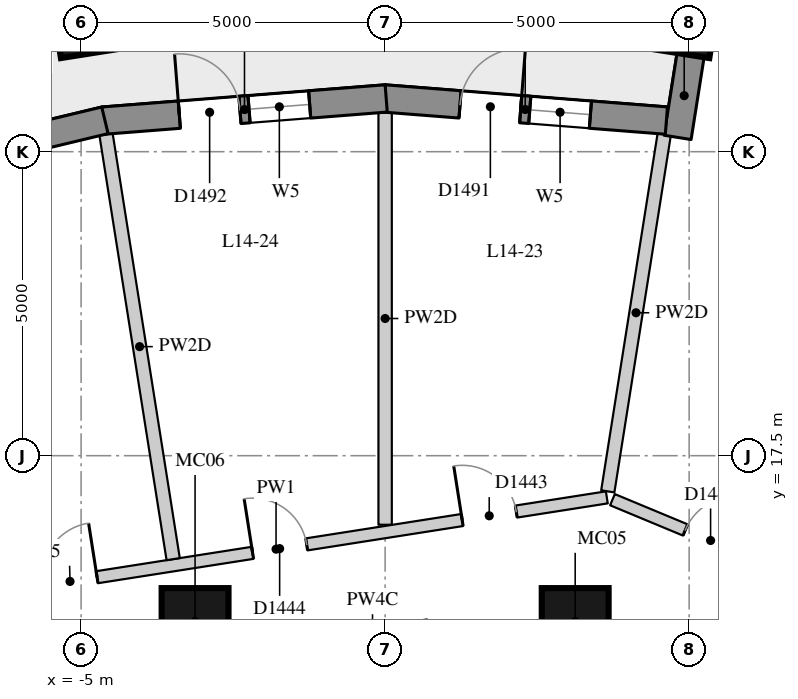
"""IFC4 building model, lengths in metres.
Left out: names, types, materials, properties, quantities, classifications, styles, units other than length and angle.
Written with IfcOpenShell. Run it as: python <this file> out.ifc"""

import sys

from ifc_helpers import new_model, si_unit, direction, frame, frame_2d, origin, origin_2d, place, context, subcontext, project, spatial, rectangle, extrude, element, fill, save


model = new_model("IFC4")
c1 = context("Model", 3, precision=1e-05, world=origin(), true_north=direction((0.0, 1.0)))
c2 = subcontext(c1, "Body", "Model", "MODEL_VIEW")
j1 = project(units=[si_unit("LENGTHUNIT", "METRE"), si_unit("PLANEANGLEUNIT", "RADIAN")], contexts=[c1])
p1 = place(None, origin())
s1 = spatial("IfcSite", under=j1, at=p1, CompositionType="ELEMENT")
p2 = place(p1, origin())
s2 = spatial("IfcBuilding", under=s1, at=p2, CompositionType="ELEMENT")
p3 = place(p2, frame((0.0, 0.0, 54.7)))
s3 = spatial("IfcBuildingStorey", under=s2, at=p3, CompositionType="ELEMENT", Elevation=54.7)
for number, where, z_axis, x_axis in (
    (1, (4.906, 24.866, 0.0), (0.0, 0.0, 1.0), (0.156, 0.988, 0.0)),
    (2, (-4.906, 24.866, 0.0), (0.0, 0.0, 1.0), (-0.156, 0.988, 0.0)),
):
    element("IfcColumn", number, at=place(p3, frame(where, z_axis=z_axis, x_axis=x_axis)), inside=s3, PredefinedType="COLUMN", context=c2, shape_type="SweptSolid", body=[
        extrude(rectangle(XDim=1.5, YDim=1.1, at=origin_2d()), origin(), (0.0, 0.0, 1.0), 3.3),
    ])
for number, where, z_axis, x_axis in (
    (3, (3.126, 14.772, 0.0), (0.0, 0.0, 1.0), (1.0, 0.0, 0.0)),
    (4, (-3.126, 14.772, 0.0), (0.0, 0.0, 1.0), (1.0, 0.0, 0.0)),
):
    element("IfcColumn", number, at=place(p3, frame(where, z_axis=z_axis, x_axis=x_axis)), inside=s3, PredefinedType="COLUMN", context=c2, shape_type="SweptSolid", body=[
        extrude(rectangle(XDim=1.1, YDim=1.1, at=origin_2d()), origin(), (0.0, 0.0, 1.0), 3.3),
    ])
p4 = place(p3, frame((9.308, 24.35, 0.0), z_axis=(0.0, 0.0, 1.0), x_axis=(-0.972496561493, 0.232917233979, 0.0)))
e5 = element("IfcWall", 5, at=p4, inside=s3, PredefinedType="SOLIDWALL", context=c2, shape_type="SweptSolid", body=[
    extrude(rectangle(XDim=3.911, YDim=0.45, at=frame_2d((1.956, 0.0))), origin(), (0.0, 0.0, 1.0), 3.02),
])
p5 = place(p4, frame((0.855, 0.0, 0.4)))
e6 = element("IfcOpeningElement", 6, at=p5, cuts=e5, PredefinedType="OPENING", context=c2, shape_type="SweptSolid", body=[
    extrude(rectangle(XDim=2.2, YDim=1.75, at=frame_2d((1.1, 0.875))), frame((0.0, 0.235, 0.0), z_axis=(0.0, -1.0, 0.0), x_axis=(1.0, 0.0, 0.0)), (0.0, 0.0, 1.0), 0.47),
])
p6 = place(p3, frame((5.027, 24.108, 0.0), z_axis=(0.0, 0.0, 1.0), x_axis=(-0.156133927791, -0.98773589415, 0.0)))
e7 = element("IfcWall", 7, at=p6, inside=s3, PredefinedType="SOLIDWALL", context=c2, shape_type="SweptSolid", body=[
    extrude(rectangle(XDim=1.39, YDim=0.45, at=frame_2d((0.695, 0.0))), origin(), (0.0, 0.0, 1.0), 2.47),
])
p7 = place(p3, frame((4.626, 23.011, 0.0), z_axis=(0.0, 0.0, 1.0), x_axis=(-0.996937095772, 0.078207589615, 0.0)))
e8 = element("IfcWall", 8, at=p7, inside=s3, PredefinedType="SOLIDWALL", context=c2, shape_type="SweptSolid", body=[
    extrude(rectangle(XDim=4.657, YDim=0.45, at=frame_2d((2.329, 0.0))), origin(), (0.0, 0.0, 1.0), 3.02),
])
p8 = place(p7, frame((1.254, 0.0, 0.4)))
e9 = element("IfcOpeningElement", 9, at=p8, cuts=e8, PredefinedType="OPENING", context=c2, shape_type="SweptSolid", body=[
    extrude(rectangle(XDim=1.0, YDim=1.75, at=frame_2d((0.5, 0.875))), frame((0.0, 0.235, 0.0), z_axis=(0.0, -1.0, 0.0), x_axis=(1.0, 0.0, 0.0)), (0.0, 0.0, 1.0), 0.47),
])
p9 = place(p7, frame((2.404, 0.0, 0.0)))
e10 = element("IfcOpeningElement", 10, at=p9, cuts=e8, PredefinedType="OPENING", context=c2, shape_type="SweptSolid", body=[
    extrude(rectangle(XDim=1.0, YDim=2.15, at=frame_2d((0.5, 1.075))), frame((0.0, 0.235, 0.0), z_axis=(0.0, -1.0, 0.0), x_axis=(1.0, 0.0, 0.0)), (0.0, 0.0, 1.0), 0.47),
])
p10 = place(p3, frame((0.018, 23.376, 0.0), z_axis=(0.0, 0.0, 1.0), x_axis=(-0.996935982964, -0.078221773648, 0.0)))
e11 = element("IfcWall", 11, at=p10, inside=s3, PredefinedType="SOLIDWALL", context=c2, shape_type="SweptSolid", body=[
    extrude(rectangle(XDim=4.676, YDim=0.45, at=frame_2d((2.338, 0.0))), origin(), (0.0, 0.0, 1.0), 3.02),
])
p11 = place(p10, frame((1.263, 0.0, 0.4)))
e12 = element("IfcOpeningElement", 12, at=p11, cuts=e11, PredefinedType="OPENING", context=c2, shape_type="SweptSolid", body=[
    extrude(rectangle(XDim=1.0, YDim=1.75, at=frame_2d((0.5, 0.875))), frame((0.0, 0.235, 0.0), z_axis=(0.0, -1.0, 0.0), x_axis=(1.0, 0.0, 0.0)), (0.0, 0.0, 1.0), 0.47),
])
p12 = place(p10, frame((2.413, 0.0, 0.0)))
e13 = element("IfcOpeningElement", 13, at=p12, cuts=e11, PredefinedType="OPENING", context=c2, shape_type="SweptSolid", body=[
    extrude(rectangle(XDim=1.0, YDim=2.15, at=frame_2d((0.5, 1.075))), frame((0.0, 0.235, 0.0), z_axis=(0.0, -1.0, 0.0), x_axis=(1.0, 0.0, 0.0)), (0.0, 0.0, 1.0), 0.47),
])
p13 = place(p3, frame((-4.608, 23.016, 0.0), z_axis=(0.0, 0.0, 1.0), x_axis=(-0.972343667289, -0.233554688847, 0.0)))
e14 = element("IfcWall", 14, at=p13, inside=s3, PredefinedType="SOLIDWALL", context=c2, shape_type="SweptSolid", body=[
    extrude(rectangle(XDim=4.624, YDim=0.45, at=frame_2d((2.312, 0.0))), origin(), (0.0, 0.0, 1.0), 3.02),
])
p14 = place(p13, frame((1.237, 0.0, 0.4)))
e15 = element("IfcOpeningElement", 15, at=p14, cuts=e14, PredefinedType="OPENING", context=c2, shape_type="SweptSolid", body=[
    extrude(rectangle(XDim=1.0, YDim=1.75, at=frame_2d((0.5, 0.875))), frame((0.0, 0.235, 0.0), z_axis=(0.0, -1.0, 0.0), x_axis=(1.0, 0.0, 0.0)), (0.0, 0.0, 1.0), 0.47),
])
p15 = place(p13, frame((2.387, 0.0, 0.0)))
e16 = element("IfcOpeningElement", 16, at=p15, cuts=e14, PredefinedType="OPENING", context=c2, shape_type="SweptSolid", body=[
    extrude(rectangle(XDim=1.0, YDim=2.15, at=frame_2d((0.5, 1.075))), frame((0.0, 0.235, 0.0), z_axis=(0.0, -1.0, 0.0), x_axis=(1.0, 0.0, 0.0)), (0.0, 0.0, 1.0), 0.47),
])
p16 = place(p3, frame((-7.234, 15.11, 0.0), z_axis=(0.0, 0.0, 1.0), x_axis=(0.987957763282, 0.154723811906, 0.0)))
e17 = element("IfcWall", 17, at=p16, inside=s3, PredefinedType="PARTITIONING", context=c2, shape_type="SweptSolid", body=[
    extrude(rectangle(XDim=11.012, YDim=0.2, at=frame_2d((5.506, 0.0))), origin(), (0.0, 0.0, 1.0), 3.02),
])
p17 = place(p16, frame((8.605, 0.0, 0.0)))
e18 = element("IfcOpeningElement", 18, at=p17, cuts=e17, PredefinedType="OPENING", context=c2, shape_type="SweptSolid", body=[
    extrude(rectangle(XDim=0.9, YDim=2.1, at=frame_2d((0.45, 1.05))), frame((0.0, 0.11, 0.0), z_axis=(0.0, -1.0, 0.0), x_axis=(1.0, 0.0, 0.0)), (0.0, 0.0, 1.0), 0.22),
])
p18 = place(p16, frame((5.116, 0.0, 0.0)))
e19 = element("IfcOpeningElement", 19, at=p18, cuts=e17, PredefinedType="OPENING", context=c2, shape_type="SweptSolid", body=[
    extrude(rectangle(XDim=0.9, YDim=2.1, at=frame_2d((0.45, 1.05))), frame((0.0, 0.11, 0.0), z_axis=(0.0, -1.0, 0.0), x_axis=(1.0, 0.0, 0.0)), (0.0, 0.0, 1.0), 0.22),
])
p19 = place(p16, frame((1.626, 0.0, 0.0)))
e20 = element("IfcOpeningElement", 20, at=p19, cuts=e17, PredefinedType="OPENING", context=c2, shape_type="SweptSolid", body=[
    extrude(rectangle(XDim=0.9, YDim=2.1, at=frame_2d((0.45, 1.05))), frame((0.0, 0.11, 0.0), z_axis=(0.0, -1.0, 0.0), x_axis=(1.0, 0.0, 0.0)), (0.0, 0.0, 1.0), 0.22),
])
p20 = place(p3, frame((3.739, 16.776, 0.0), z_axis=(0.0, 0.0, 1.0), x_axis=(0.923364778497, -0.383923802117, 0.0)))
e21 = element("IfcWall", 21, at=p20, inside=s3, PredefinedType="PARTITIONING", context=c2, shape_type="SweptSolid", body=[
    extrude(rectangle(XDim=8.273, YDim=0.2, at=frame_2d((4.137, 0.0))), origin(), (0.0, 0.0, 1.0), 3.02),
])
p21 = place(p20, frame((6.153, 0.0, 0.0)))
e22 = element("IfcOpeningElement", 22, at=p21, cuts=e21, PredefinedType="OPENING", context=c2, shape_type="SweptSolid", body=[
    extrude(rectangle(XDim=1.1, YDim=2.1, at=frame_2d((0.55, 1.05))), frame((0.0, 0.11, 0.0), z_axis=(0.0, -1.0, 0.0), x_axis=(1.0, 0.0, 0.0)), (0.0, 0.0, 1.0), 0.22),
])
p22 = place(p20, frame((1.298, 0.0, 0.0)))
e23 = element("IfcOpeningElement", 23, at=p22, cuts=e21, PredefinedType="OPENING", context=c2, shape_type="SweptSolid", body=[
    extrude(rectangle(XDim=0.9, YDim=2.1, at=frame_2d((0.45, 1.05))), frame((0.0, 0.11, 0.0), z_axis=(0.0, -1.0, 0.0), x_axis=(1.0, 0.0, 0.0)), (0.0, 0.0, 1.0), 0.22),
])
p23 = place(p3, frame((4.591, 22.789, 0.0), z_axis=(0.0, 0.0, 1.0), x_axis=(-0.156126964527, -0.987736994826, 0.0)))
e24 = element("IfcWall", 24, at=p23, inside=s3, PredefinedType="PARTITIONING", context=c2, shape_type="SweptSolid", body=[
    extrude(rectangle(XDim=5.948, YDim=0.22, at=frame_2d((2.974, 0.0))), origin(), (0.0, 0.0, 1.0), 2.47),
])
p24 = place(p3, frame((0.0, 23.149, 0.0), z_axis=(0.0, 0.0, 1.0), x_axis=(0.0, -1.0, 0.0)))
e25 = element("IfcWall", 25, at=p24, inside=s3, PredefinedType="PARTITIONING", context=c2, shape_type="SweptSolid", body=[
    extrude(rectangle(XDim=6.784, YDim=0.22, at=frame_2d((3.392, 0.0))), origin(), (0.0, 0.0, 1.0), 2.47),
])
p25 = place(p3, frame((-4.591, 22.789, 0.0), z_axis=(0.0, 0.0, 1.0), x_axis=(0.15613617795, -0.987735538459, 0.0)))
e26 = element("IfcWall", 26, at=p25, inside=s3, PredefinedType="PARTITIONING", context=c2, shape_type="SweptSolid", body=[
    extrude(rectangle(XDim=7.077, YDim=0.22, at=frame_2d((3.539, 0.0))), origin(), (0.0, 0.0, 1.0), 2.47),
])
p26 = place(p8, origin())
e27 = element("IfcWindow", 27, at=p26, inside=s3, PartitioningType="SINGLE_PANEL", PredefinedType="WINDOW", context=c2, shape_type="SweptSolid", body=[
    extrude(rectangle(XDim=1.0, YDim=1.75, at=frame_2d((0.5, 0.875))), frame((0.0, 0.035, 0.0), z_axis=(0.0, -1.0, 0.0), x_axis=(1.0, 0.0, 0.0)), (0.0, 0.0, 1.0), 0.06),
])
fill(e9, e27)
p27 = place(p9, frame((1.0, 0.0, 0.0), z_axis=(0.0, 0.0, 1.0), x_axis=(-1.0, 0.0, 0.0)))
e28 = element("IfcDoor", 28, at=p27, inside=s3, OperationType="SINGLE_SWING_RIGHT", PredefinedType="DOOR", context=c2, shape_type="SweptSolid", body=[
    extrude(rectangle(XDim=1.0, YDim=2.15, at=frame_2d((0.5, 1.075))), frame((0.0, 0.075, 0.0), z_axis=(0.0, -1.0, 0.0), x_axis=(1.0, 0.0, 0.0)), (0.0, 0.0, 1.0), 0.05),
])
fill(e10, e28)
p28 = place(p11, origin())
e29 = element("IfcWindow", 29, at=p28, inside=s3, PartitioningType="SINGLE_PANEL", PredefinedType="WINDOW", context=c2, shape_type="SweptSolid", body=[
    extrude(rectangle(XDim=1.0, YDim=1.75, at=frame_2d((0.5, 0.875))), frame((0.0, 0.035, 0.0), z_axis=(0.0, -1.0, 0.0), x_axis=(1.0, 0.0, 0.0)), (0.0, 0.0, 1.0), 0.06),
])
fill(e12, e29)
p29 = place(p12, frame((1.0, 0.0, 0.0), z_axis=(0.0, 0.0, 1.0), x_axis=(-1.0, 0.0, 0.0)))
e30 = element("IfcDoor", 30, at=p29, inside=s3, OperationType="SINGLE_SWING_LEFT", PredefinedType="DOOR", context=c2, shape_type="SweptSolid", body=[
    extrude(rectangle(XDim=1.0, YDim=2.15, at=frame_2d((0.5, 1.075))), frame((0.0, 0.075, 0.0), z_axis=(0.0, -1.0, 0.0), x_axis=(1.0, 0.0, 0.0)), (0.0, 0.0, 1.0), 0.05),
])
fill(e13, e30)
p30 = place(p22, origin())
e31 = element("IfcDoor", 31, at=p30, inside=s3, OperationType="SINGLE_SWING_RIGHT", PredefinedType="DOOR", context=c2, shape_type="SweptSolid", body=[
    extrude(rectangle(XDim=0.9, YDim=2.1, at=frame_2d((0.45, 1.05))), frame((0.0, 0.025, 0.0), z_axis=(0.0, -1.0, 0.0), x_axis=(1.0, 0.0, 0.0)), (0.0, 0.0, 1.0), 0.05),
])
fill(e23, e31)
p31 = place(p17, origin())
e32 = element("IfcDoor", 32, at=p31, inside=s3, OperationType="SINGLE_SWING_LEFT", PredefinedType="DOOR", context=c2, shape_type="SweptSolid", body=[
    extrude(rectangle(XDim=0.9, YDim=2.1, at=frame_2d((0.45, 1.05))), frame((0.0, 0.025, 0.0), z_axis=(0.0, -1.0, 0.0), x_axis=(1.0, 0.0, 0.0)), (0.0, 0.0, 1.0), 0.05),
])
fill(e18, e32)
p32 = place(p18, origin())
e33 = element("IfcDoor", 33, at=p32, inside=s3, OperationType="SINGLE_SWING_LEFT", PredefinedType="DOOR", context=c2, shape_type="SweptSolid", body=[
    extrude(rectangle(XDim=0.9, YDim=2.1, at=frame_2d((0.45, 1.05))), frame((0.0, 0.025, 0.0), z_axis=(0.0, -1.0, 0.0), x_axis=(1.0, 0.0, 0.0)), (0.0, 0.0, 1.0), 0.05),
])
fill(e19, e33)
p33 = place(p19, origin())
e34 = element("IfcDoor", 34, at=p33, inside=s3, OperationType="SINGLE_SWING_RIGHT", PredefinedType="DOOR", context=c2, shape_type="SweptSolid", body=[
    extrude(rectangle(XDim=0.9, YDim=2.1, at=frame_2d((0.45, 1.05))), frame((0.0, 0.025, 0.0), z_axis=(0.0, -1.0, 0.0), x_axis=(1.0, 0.0, 0.0)), (0.0, 0.0, 1.0), 0.05),
])
fill(e20, e34)
save(model, sys.argv[1])
